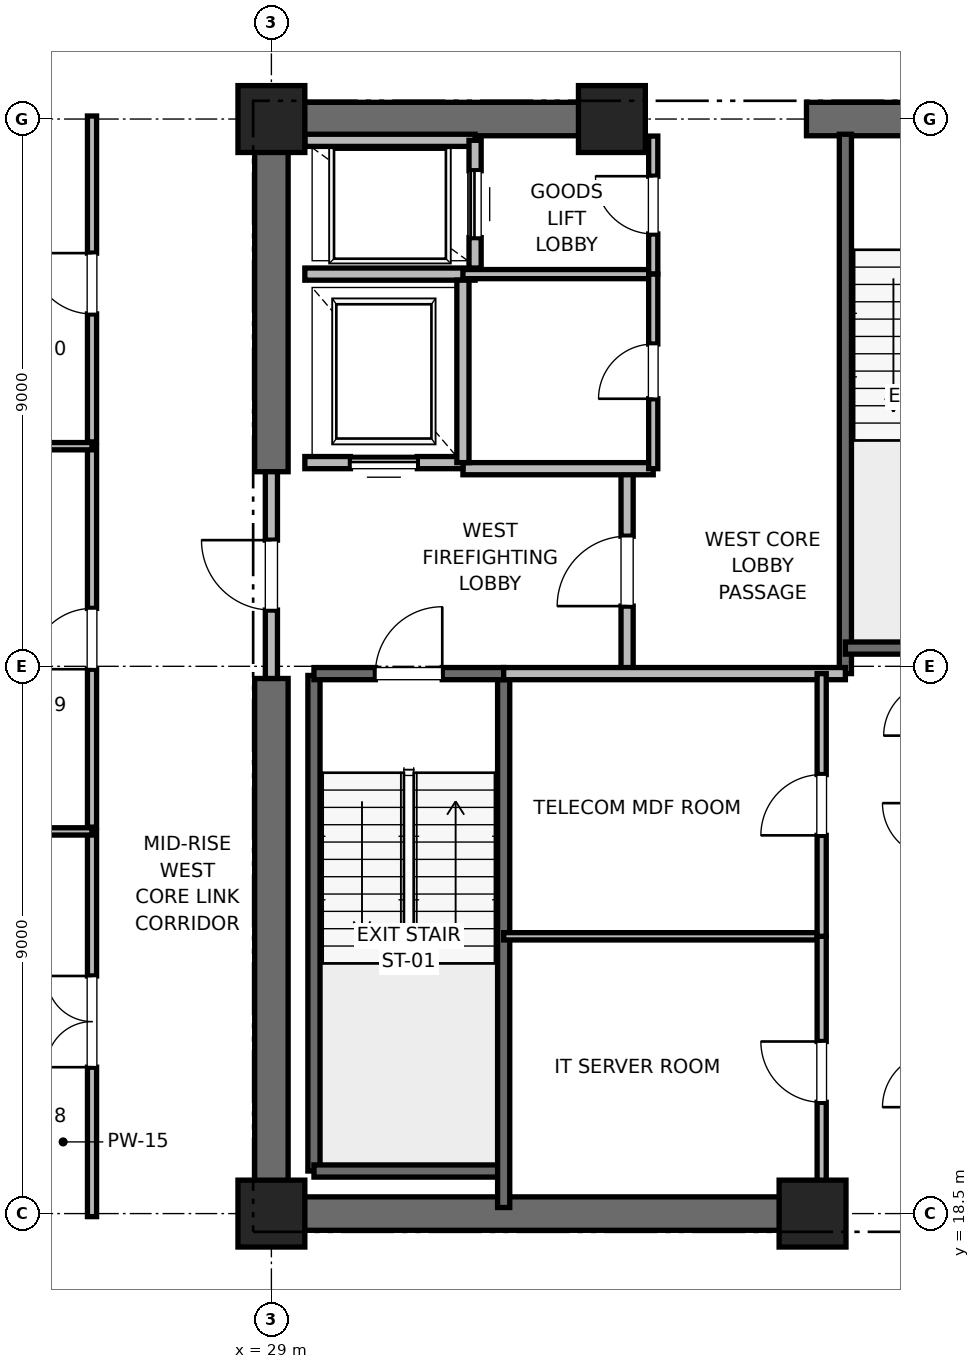
"""IFC4 building model, lengths in metres.
Left out: names, types, materials, properties, quantities, classifications, styles, units other than length and angle.
Written with IfcOpenShell. Run it as: python <this file> out.ifc"""

import sys

from ifc_helpers import new_model, si_unit, direction, frame, frame_2d, origin, origin_2d, place, context, subcontext, project, spatial, rectangle, extrude, element, fill, save


model = new_model("IFC4")
c1 = context("Model", 3, precision=1e-05, world=origin(), true_north=direction((0.0, 1.0)))
c2 = subcontext(c1, "Body", "Model", "MODEL_VIEW")
j1 = project(units=[si_unit("LENGTHUNIT", "METRE"), si_unit("PLANEANGLEUNIT", "RADIAN")], contexts=[c1])
p1 = place(None, origin())
s1 = spatial("IfcSite", under=j1, at=p1, CompositionType="ELEMENT")
p2 = place(p1, origin())
s2 = spatial("IfcBuilding", under=s1, at=p2, CompositionType="ELEMENT")
p3 = place(p2, frame((0.0, 0.0, 168.4)))
s3 = spatial("IfcBuildingStorey", under=s2, at=p3, CompositionType="ELEMENT", Elevation=168.4)
for number, where, z_axis, x_axis in (
    (1, (29.0, 18.5, 0.0), (0.0, 0.0, 1.0), (1.0, 0.0, 0.0)),
    (2, (29.0, 36.5, 0.0), (0.0, 0.0, 1.0), (1.0, 0.0, 0.0)),
    (3, (37.9, 18.5, 0.0), (0.0, 0.0, 1.0), (1.0, 0.0, 0.0)),
    (4, (34.6, 36.5, 0.0), (0.0, 0.0, 1.0), (1.0, 0.0, 0.0)),
):
    element("IfcColumn", number, at=place(p3, frame(where, z_axis=z_axis, x_axis=x_axis)), inside=s3, PredefinedType="PILASTER", context=c2, shape_type="SweptSolid", body=[
        extrude(rectangle(XDim=1.1, YDim=1.1, at=origin_2d()), origin(), (0.0, 0.0, 1.0), 4.0),
    ])
p4 = place(p3, frame((29.0, 18.5, 0.0), z_axis=(0.0, 0.0, 1.0), x_axis=(1.0, 0.0, 0.0)))
e5 = element("IfcWall", 5, at=p4, inside=s3, PredefinedType="SHEAR", context=c2, shape_type="SweptSolid", body=[
    extrude(rectangle(XDim=9.2, YDim=0.55, at=frame_2d((4.6, 0.0))), origin(), (0.0, 0.0, 1.0), 3.775),
])
p5 = place(p3, frame((29.0, 36.5, 0.0), z_axis=(0.0, 0.0, 1.0), x_axis=(1.0, 0.0, 0.0)))
e6 = element("IfcWall", 6, at=p5, inside=s3, PredefinedType="SHEAR", context=c2, shape_type="SweptSolid", body=[
    extrude(rectangle(XDim=5.8, YDim=0.55, at=frame_2d((2.9, 0.0))), origin(), (0.0, 0.0, 1.0), 3.775),
])
p6 = place(p3, frame((37.8, 36.5, 0.0), z_axis=(0.0, 0.0, 1.0), x_axis=(1.0, 0.0, 0.0)))
e7 = element("IfcWall", 7, at=p6, inside=s3, PredefinedType="SHEAR", context=c2, shape_type="SweptSolid", body=[
    extrude(rectangle(XDim=4.4, YDim=0.55, at=frame_2d((2.2, 0.0))), origin(), (0.0, 0.0, 1.0), 3.775),
])
p7 = place(p6, frame((1.65, 0.0, 0.0)))
e8 = element("IfcOpeningElement", 8, at=p7, cuts=e7, PredefinedType="OPENING", context=c2, shape_type="SweptSolid", body=[
    extrude(rectangle(XDim=1.1, YDim=2.15, at=frame_2d((0.55, 1.075))), frame((0.0, 0.275, 0.0), z_axis=(0.0, -1.0, 0.0), x_axis=(1.0, 0.0, 0.0)), (0.0, 0.0, 1.0), 0.55),
])
p8 = place(p3, frame((29.0, 18.5, 0.0), z_axis=(0.0, 0.0, 1.0), x_axis=(0.0, 1.0, 0.0)))
e9 = element("IfcWall", 9, at=p8, inside=s3, PredefinedType="SHEAR", context=c2, shape_type="SweptSolid", body=[
    extrude(rectangle(XDim=8.8, YDim=0.55, at=frame_2d((4.4, 0.0))), origin(), (0.0, 0.0, 1.0), 3.775),
])
p9 = place(p3, frame((29.0, 30.7, 0.0), z_axis=(0.0, 0.0, 1.0), x_axis=(0.0, 1.0, 0.0)))
e10 = element("IfcWall", 10, at=p9, inside=s3, PredefinedType="SHEAR", context=c2, shape_type="SweptSolid", body=[
    extrude(rectangle(XDim=5.8, YDim=0.55, at=frame_2d((2.9, 0.0))), origin(), (0.0, 0.0, 1.0), 3.775),
])
p10 = place(p3, frame((29.7, 19.2, 0.0), z_axis=(0.0, 0.0, 1.0), x_axis=(0.0, 1.0, 0.0)))
e11 = element("IfcWall", 11, at=p10, inside=s3, PredefinedType="SOLIDWALL", context=c2, shape_type="SweptSolid", body=[
    extrude(rectangle(XDim=8.15, YDim=0.2, at=frame_2d((4.075, 0.0))), origin(), (0.0, 0.0, 1.0), 3.775),
])
p11 = place(p3, frame((29.7, 19.2, 0.0), z_axis=(0.0, 0.0, 1.0), x_axis=(1.0, 0.0, 0.0)))
e12 = element("IfcWall", 12, at=p11, inside=s3, PredefinedType="SOLIDWALL", context=c2, shape_type="SweptSolid", body=[
    extrude(rectangle(XDim=3.12, YDim=0.2, at=frame_2d((1.56, 0.0))), origin(), (0.0, 0.0, 1.0), 3.775),
])
p12 = place(p3, frame((32.82, 18.6, 0.0), z_axis=(0.0, 0.0, 1.0), x_axis=(0.0, 1.0, 0.0)))
e13 = element("IfcWall", 13, at=p12, inside=s3, PredefinedType="SOLIDWALL", context=c2, shape_type="SweptSolid", body=[
    extrude(rectangle(XDim=8.78, YDim=0.2, at=frame_2d((4.39, 0.0))), origin(), (0.0, 0.0, 1.0), 3.775),
])
p13 = place(p3, frame((29.7, 27.38, 0.0), z_axis=(0.0, 0.0, 1.0), x_axis=(1.0, 0.0, 0.0)))
e14 = element("IfcWall", 14, at=p13, inside=s3, PredefinedType="SOLIDWALL", context=c2, shape_type="SweptSolid", body=[
    extrude(rectangle(XDim=3.12, YDim=0.2, at=frame_2d((1.56, 0.0))), origin(), (0.0, 0.0, 1.0), 3.775),
])
p14 = place(p13, frame((1.01, 0.0, 0.0)))
e15 = element("IfcOpeningElement", 15, at=p14, cuts=e14, PredefinedType="OPENING", context=c2, shape_type="SweptSolid", body=[
    extrude(rectangle(XDim=1.1, YDim=2.15, at=frame_2d((0.55, 1.075))), frame((0.0, 0.1, 0.0), z_axis=(0.0, -1.0, 0.0), x_axis=(1.0, 0.0, 0.0)), (0.0, 0.0, 1.0), 0.2),
])
p15 = place(p3, frame((38.44, 27.38, 0.0), z_axis=(0.0, 0.0, 1.0), x_axis=(0.0, 1.0, 0.0)))
e16 = element("IfcWall", 16, at=p15, inside=s3, PredefinedType="SOLIDWALL", context=c2, shape_type="SweptSolid", body=[
    extrude(rectangle(XDim=8.87, YDim=0.2, at=frame_2d((4.435, 0.0))), origin(), (0.0, 0.0, 1.0), 3.775),
])
p16 = place(p3, frame((38.44, 27.8, 0.0), z_axis=(0.0, 0.0, 1.0), x_axis=(1.0, 0.0, 0.0)))
e17 = element("IfcWall", 17, at=p16, inside=s3, PredefinedType="SOLIDWALL", context=c2, shape_type="SweptSolid", body=[
    extrude(rectangle(XDim=3.32, YDim=0.2, at=frame_2d((1.66, 0.0))), origin(), (0.0, 0.0, 1.0), 3.775),
])
p17 = place(p3, frame((34.85, 27.38, 0.0), z_axis=(0.0, 0.0, 1.0), x_axis=(0.0, 1.0, 0.0)))
e18 = element("IfcWall", 18, at=p17, inside=s3, PredefinedType="PARTITIONING", context=c2, shape_type="SweptSolid", body=[
    extrude(rectangle(XDim=3.37, YDim=0.2, at=frame_2d((1.685, 0.0))), origin(), (0.0, 0.0, 1.0), 3.775),
])
p18 = place(p17, frame((1.11, 0.0, 0.0)))
e19 = element("IfcOpeningElement", 19, at=p18, cuts=e18, PredefinedType="OPENING", context=c2, shape_type="SweptSolid", body=[
    extrude(rectangle(XDim=1.15, YDim=2.2, at=frame_2d((0.575, 1.1))), frame((0.0, 0.1, 0.0), z_axis=(0.0, -1.0, 0.0), x_axis=(1.0, 0.0, 0.0)), (0.0, 0.0, 1.0), 0.2),
])
p19 = place(p3, frame((29.0, 27.3, 0.0), z_axis=(0.0, 0.0, 1.0), x_axis=(0.0, 1.0, 0.0)))
e20 = element("IfcWall", 20, at=p19, inside=s3, PredefinedType="PARTITIONING", context=c2, shape_type="SweptSolid", body=[
    extrude(rectangle(XDim=3.4, YDim=0.2, at=frame_2d((1.7, 0.0))), origin(), (0.0, 0.0, 1.0), 2.755),
])
p20 = place(p19, frame((1.125, 0.0, 0.0)))
e21 = element("IfcOpeningElement", 21, at=p20, cuts=e20, PredefinedType="OPENING", context=c2, shape_type="SweptSolid", body=[
    extrude(rectangle(XDim=1.15, YDim=2.2, at=frame_2d((0.575, 1.1))), frame((0.0, 0.1, 0.0), z_axis=(0.0, -1.0, 0.0), x_axis=(1.0, 0.0, 0.0)), (0.0, 0.0, 1.0), 0.2),
])
p21 = place(p3, frame((32.82, 27.38, 0.0), z_axis=(0.0, 0.0, 1.0), x_axis=(1.0, 0.0, 0.0)))
e22 = element("IfcWall", 22, at=p21, inside=s3, PredefinedType="PARTITIONING", context=c2, shape_type="SweptSolid", body=[
    extrude(rectangle(XDim=5.62, YDim=0.2, at=frame_2d((2.81, 0.0))), origin(), (0.0, 0.0, 1.0), 3.775),
])
p22 = place(p3, frame((32.15, 30.75, 0.0), z_axis=(0.0, 0.0, 1.0), x_axis=(1.0, 0.0, 0.0)))
e23 = element("IfcWall", 23, at=p22, inside=s3, PredefinedType="PARTITIONING", context=c2, shape_type="SweptSolid", body=[
    extrude(rectangle(XDim=3.13, YDim=0.2, at=frame_2d((1.565, 0.0))), origin(), (0.0, 0.0, 1.0), 3.775),
])
p23 = place(p3, frame((29.55, 30.85, 0.0), z_axis=(0.0, 0.0, 1.0), x_axis=(1.0, 0.0, 0.0)))
e24 = element("IfcWall", 24, at=p23, inside=s3, PredefinedType="SOLIDWALL", context=c2, shape_type="SweptSolid", body=[
    extrude(rectangle(XDim=2.6, YDim=0.2, at=frame_2d((1.3, 0.0))), origin(), (0.0, 0.0, 1.0), 2.755),
])
p24 = place(p23, frame((0.75, 0.0, 0.0)))
e25 = element("IfcOpeningElement", 25, at=p24, cuts=e24, PredefinedType="OPENING", context=c2, shape_type="SweptSolid", body=[
    extrude(rectangle(XDim=1.1, YDim=2.2, at=frame_2d((0.55, 1.1))), frame((0.0, 0.1, 0.0), z_axis=(0.0, -1.0, 0.0), x_axis=(1.0, 0.0, 0.0)), (0.0, 0.0, 1.0), 0.2),
])
p25 = place(p3, frame((29.55, 33.95, 0.0), z_axis=(0.0, 0.0, 1.0), x_axis=(1.0, 0.0, 0.0)))
e26 = element("IfcWall", 26, at=p25, inside=s3, PredefinedType="SOLIDWALL", context=c2, shape_type="SweptSolid", body=[
    extrude(rectangle(XDim=2.8, YDim=0.2, at=frame_2d((1.4, 0.0))), origin(), (0.0, 0.0, 1.0), 3.775),
])
p26 = place(p3, frame((32.15, 30.85, 0.0), z_axis=(0.0, 0.0, 1.0), x_axis=(0.0, 1.0, 0.0)))
e27 = element("IfcWall", 27, at=p26, inside=s3, PredefinedType="SOLIDWALL", context=c2, shape_type="SweptSolid", body=[
    extrude(rectangle(XDim=3.0, YDim=0.2, at=frame_2d((1.5, 0.0))), origin(), (0.0, 0.0, 1.0), 3.775),
])
p27 = place(p3, frame((32.35, 36.15, 0.0), z_axis=(0.0, 0.0, 1.0), x_axis=(-1.0, 0.0, 0.0)))
e28 = element("IfcWall", 28, at=p27, inside=s3, PredefinedType="SOLIDWALL", context=c2, shape_type="SweptSolid", body=[
    extrude(rectangle(XDim=2.8, YDim=0.2, at=frame_2d((1.4, 0.0))), origin(), (0.0, 0.0, 1.0), 2.985),
])
p28 = place(p3, frame((32.35, 34.05, 0.0), z_axis=(0.0, 0.0, 1.0), x_axis=(0.0, 1.0, 0.0)))
e29 = element("IfcWall", 29, at=p28, inside=s3, PredefinedType="SOLIDWALL", context=c2, shape_type="SweptSolid", body=[
    extrude(rectangle(XDim=2.1, YDim=0.2, at=frame_2d((1.05, 0.0))), origin(), (0.0, 0.0, 1.0), 3.775),
])
p29 = place(p28, frame((0.5, 0.0, 0.0)))
e30 = element("IfcOpeningElement", 30, at=p29, cuts=e29, PredefinedType="OPENING", context=c2, shape_type="SweptSolid", body=[
    extrude(rectangle(XDim=1.1, YDim=2.2, at=frame_2d((0.55, 1.1))), frame((0.0, 0.1, 0.0), z_axis=(0.0, -1.0, 0.0), x_axis=(1.0, 0.0, 0.0)), (0.0, 0.0, 1.0), 0.2),
])
p30 = place(p3, frame((32.15, 33.95, 0.0), z_axis=(0.0, 0.0, 1.0), x_axis=(1.0, 0.0, 0.0)))
e31 = element("IfcWall", 31, at=p30, inside=s3, PredefinedType="PARTITIONING", context=c2, shape_type="SweptSolid", body=[
    extrude(rectangle(XDim=3.13, YDim=0.15, at=frame_2d((1.565, 0.0))), origin(), (0.0, 0.0, 1.0), 2.85),
])
p31 = place(p3, frame((35.28, 33.95, 0.0), z_axis=(0.0, 0.0, 1.0), x_axis=(0.0, 1.0, 0.0)))
e32 = element("IfcWall", 32, at=p31, inside=s3, PredefinedType="PARTITIONING", context=c2, shape_type="SweptSolid", body=[
    extrude(rectangle(XDim=2.27, YDim=0.15, at=frame_2d((1.135, 0.0))), origin(), (0.0, 0.0, 1.0), 2.755),
])
p32 = place(p31, frame((0.66, 0.0, 0.0)))
e33 = element("IfcOpeningElement", 33, at=p32, cuts=e32, PredefinedType="OPENING", context=c2, shape_type="SweptSolid", body=[
    extrude(rectangle(XDim=0.95, YDim=2.15, at=frame_2d((0.475, 1.075))), frame((0.0, 0.075, 0.0), z_axis=(0.0, -1.0, 0.0), x_axis=(1.0, 0.0, 0.0)), (0.0, 0.0, 1.0), 0.15),
])
p33 = place(p3, frame((35.28, 30.75, 0.0), z_axis=(0.0, 0.0, 1.0), x_axis=(0.0, 1.0, 0.0)))
e34 = element("IfcWall", 34, at=p33, inside=s3, PredefinedType="PARTITIONING", context=c2, shape_type="SweptSolid", body=[
    extrude(rectangle(XDim=3.2, YDim=0.15, at=frame_2d((1.6, 0.0))), origin(), (0.0, 0.0, 1.0), 2.85),
])
p34 = place(p33, frame((1.15, 0.0, 0.0)))
e35 = element("IfcOpeningElement", 35, at=p34, cuts=e34, PredefinedType="OPENING", context=c2, shape_type="SweptSolid", body=[
    extrude(rectangle(XDim=0.9, YDim=2.1, at=frame_2d((0.45, 1.05))), frame((0.0, 0.075, 0.0), z_axis=(0.0, -1.0, 0.0), x_axis=(1.0, 0.0, 0.0)), (0.0, 0.0, 1.0), 0.15),
])
p35 = place(p3, frame((32.82, 23.06, 0.0), z_axis=(0.0, 0.0, 1.0), x_axis=(1.0, 0.0, 0.0)))
e36 = element("IfcWall", 36, at=p35, inside=s3, PredefinedType="PARTITIONING", context=c2, shape_type="SweptSolid", body=[
    extrude(rectangle(XDim=5.23, YDim=0.12, at=frame_2d((2.615, 0.0))), origin(), (0.0, 0.0, 1.0), 2.85),
])
p36 = place(p3, frame((38.05, 18.6, 0.0), z_axis=(0.0, 0.0, 1.0), x_axis=(0.0, 1.0, 0.0)))
e37 = element("IfcWall", 37, at=p36, inside=s3, PredefinedType="PARTITIONING", context=c2, shape_type="SweptSolid", body=[
    extrude(rectangle(XDim=4.46, YDim=0.15, at=frame_2d((2.23, 0.0))), origin(), (0.0, 0.0, 1.0), 2.755),
])
p37 = place(p36, frame((1.73, 0.0, 0.0)))
e38 = element("IfcOpeningElement", 38, at=p37, cuts=e37, PredefinedType="OPENING", context=c2, shape_type="SweptSolid", body=[
    extrude(rectangle(XDim=1.0, YDim=2.15, at=frame_2d((0.5, 1.075))), frame((0.0, 0.075, 0.0), z_axis=(0.0, -1.0, 0.0), x_axis=(1.0, 0.0, 0.0)), (0.0, 0.0, 1.0), 0.15),
])
p38 = place(p3, frame((38.05, 23.06, 0.0), z_axis=(0.0, 0.0, 1.0), x_axis=(0.0, 1.0, 0.0)))
e39 = element("IfcWall", 39, at=p38, inside=s3, PredefinedType="PARTITIONING", context=c2, shape_type="SweptSolid", body=[
    extrude(rectangle(XDim=4.32, YDim=0.15, at=frame_2d((2.16, 0.0))), origin(), (0.0, 0.0, 1.0), 2.85),
])
p39 = place(p38, frame((1.66, 0.0, 0.0)))
e40 = element("IfcOpeningElement", 40, at=p39, cuts=e39, PredefinedType="OPENING", context=c2, shape_type="SweptSolid", body=[
    extrude(rectangle(XDim=1.0, YDim=2.15, at=frame_2d((0.5, 1.075))), frame((0.0, 0.075, 0.0), z_axis=(0.0, -1.0, 0.0), x_axis=(1.0, 0.0, 0.0)), (0.0, 0.0, 1.0), 0.15),
])
p40 = place(p3, frame((26.05, 18.45, 0.0), z_axis=(0.0, 0.0, 1.0), x_axis=(0.0, 1.0, 0.0)))
e41 = element("IfcWall", 41, at=p40, inside=s3, PredefinedType="PARTITIONING", context=c2, shape_type="SweptSolid", body=[
    extrude(rectangle(XDim=6.335, YDim=0.15, at=frame_2d((3.167, 0.0))), origin(), (0.0, 0.0, 1.0), 2.85),
])
p41 = place(p40, frame((2.458, 0.0, 0.0)))
e42 = element("IfcOpeningElement", 42, at=p41, cuts=e41, PredefinedType="OPENING", context=c2, shape_type="SweptSolid", body=[
    extrude(rectangle(XDim=1.5, YDim=2.25, at=frame_2d((0.75, 1.125))), frame((0.0, 0.075, 0.0), z_axis=(0.0, -1.0, 0.0), x_axis=(1.0, 0.0, 0.0)), (0.0, 0.0, 1.0), 0.15),
])
p42 = place(p3, frame((14.897, 24.785, 0.0), z_axis=(0.0, 0.0, 1.0), x_axis=(1.0, 0.0, 0.0)))
e43 = element("IfcWall", 43, at=p42, inside=s3, PredefinedType="PARTITIONING", context=c2, shape_type="SweptSolid", body=[
    extrude(rectangle(XDim=11.153, YDim=0.12, at=frame_2d((5.577, 0.0))), origin(), (0.0, 0.0, 1.0), 2.85),
])
p43 = place(p3, frame((26.05, 24.855, 0.0), z_axis=(0.0, 0.0, 1.0), x_axis=(0.0, 1.0, 0.0)))
e44 = element("IfcWall", 44, at=p43, inside=s3, PredefinedType="PARTITIONING", context=c2, shape_type="SweptSolid", body=[
    extrude(rectangle(XDim=6.265, YDim=0.15, at=frame_2d((3.133, 0.0))), origin(), (0.0, 0.0, 1.0), 2.85),
])
p44 = place(p43, frame((2.597, 0.0, 0.0)))
e45 = element("IfcOpeningElement", 45, at=p44, cuts=e44, PredefinedType="OPENING", context=c2, shape_type="SweptSolid", body=[
    extrude(rectangle(XDim=1.0, YDim=2.15, at=frame_2d((0.5, 1.075))), frame((0.0, 0.075, 0.0), z_axis=(0.0, -1.0, 0.0), x_axis=(1.0, 0.0, 0.0)), (0.0, 0.0, 1.0), 0.15),
])
p45 = place(p3, frame((14.897, 31.12, 0.0), z_axis=(0.0, 0.0, 1.0), x_axis=(1.0, 0.0, 0.0)))
e46 = element("IfcWall", 46, at=p45, inside=s3, PredefinedType="PARTITIONING", context=c2, shape_type="SweptSolid", body=[
    extrude(rectangle(XDim=11.153, YDim=0.12, at=frame_2d((5.577, 0.0))), origin(), (0.0, 0.0, 1.0), 2.85),
])
p46 = place(p3, frame((26.05, 31.19, 0.0), z_axis=(0.0, 0.0, 1.0), x_axis=(0.0, 1.0, 0.0)))
e47 = element("IfcWall", 47, at=p46, inside=s3, PredefinedType="PARTITIONING", context=c2, shape_type="SweptSolid", body=[
    extrude(rectangle(XDim=5.36, YDim=0.15, at=frame_2d((2.68, 0.0))), origin(), (0.0, 0.0, 1.0), 2.85),
])
p47 = place(p46, frame((2.105, 0.0, 0.0)))
e48 = element("IfcOpeningElement", 48, at=p47, cuts=e47, PredefinedType="OPENING", context=c2, shape_type="SweptSolid", body=[
    extrude(rectangle(XDim=1.0, YDim=2.15, at=frame_2d((0.5, 1.075))), frame((0.0, 0.075, 0.0), z_axis=(0.0, -1.0, 0.0), x_axis=(1.0, 0.0, 0.0)), (0.0, 0.0, 1.0), 0.15),
])
p48 = place(p14, origin())
e49 = element("IfcDoor", 49, at=p48, inside=s3, OperationType="SINGLE_SWING_RIGHT", PredefinedType="DOOR", context=c2, shape_type="SweptSolid", body=[
    extrude(rectangle(XDim=1.1, YDim=2.15, at=frame_2d((0.55, 1.075))), frame((0.0, 0.025, 0.0), z_axis=(0.0, -1.0, 0.0), x_axis=(1.0, 0.0, 0.0)), (0.0, 0.0, 1.0), 0.05),
])
fill(e15, e49)
p49 = place(p18, origin())
e50 = element("IfcDoor", 50, at=p49, inside=s3, OperationType="SINGLE_SWING_LEFT", PredefinedType="DOOR", context=c2, shape_type="SweptSolid", body=[
    extrude(rectangle(XDim=1.15, YDim=2.2, at=frame_2d((0.575, 1.1))), frame((0.0, 0.025, 0.0), z_axis=(0.0, -1.0, 0.0), x_axis=(1.0, 0.0, 0.0)), (0.0, 0.0, 1.0), 0.05),
])
fill(e19, e50)
p50 = place(p20, origin())
e51 = element("IfcDoor", 51, at=p50, inside=s3, OperationType="SINGLE_SWING_RIGHT", PredefinedType="DOOR", context=c2, shape_type="SweptSolid", body=[
    extrude(rectangle(XDim=1.15, YDim=2.2, at=frame_2d((0.575, 1.1))), frame((0.0, 0.025, 0.0), z_axis=(0.0, -1.0, 0.0), x_axis=(1.0, 0.0, 0.0)), (0.0, 0.0, 1.0), 0.05),
])
fill(e21, e51)
p51 = place(p24, origin())
e52 = element("IfcDoor", 52, at=p51, inside=s3, OperationType="SLIDING_TO_RIGHT", PredefinedType="DOOR", context=c2, shape_type="SweptSolid", body=[
    extrude(rectangle(XDim=1.1, YDim=2.2, at=frame_2d((0.55, 1.1))), frame((0.0, 0.025, 0.0), z_axis=(0.0, -1.0, 0.0), x_axis=(1.0, 0.0, 0.0)), (0.0, 0.0, 1.0), 0.05),
])
fill(e25, e52)
p52 = place(p29, origin())
e53 = element("IfcDoor", 53, at=p52, inside=s3, OperationType="SLIDING_TO_RIGHT", PredefinedType="DOOR", context=c2, shape_type="SweptSolid", body=[
    extrude(rectangle(XDim=1.1, YDim=2.2, at=frame_2d((0.55, 1.1))), frame((0.0, 0.025, 0.0), z_axis=(0.0, -1.0, 0.0), x_axis=(1.0, 0.0, 0.0)), (0.0, 0.0, 1.0), 0.05),
])
fill(e30, e53)
p53 = place(p32, origin())
e54 = element("IfcDoor", 54, at=p53, inside=s3, OperationType="SINGLE_SWING_RIGHT", PredefinedType="DOOR", context=c2, shape_type="SweptSolid", body=[
    extrude(rectangle(XDim=0.95, YDim=2.15, at=frame_2d((0.475, 1.075))), frame((0.0, 0.025, 0.0), z_axis=(0.0, -1.0, 0.0), x_axis=(1.0, 0.0, 0.0)), (0.0, 0.0, 1.0), 0.05),
])
fill(e33, e54)
p54 = place(p34, origin())
e55 = element("IfcDoor", 55, at=p54, inside=s3, OperationType="SINGLE_SWING_LEFT", PredefinedType="DOOR", context=c2, shape_type="SweptSolid", body=[
    extrude(rectangle(XDim=0.9, YDim=2.1, at=frame_2d((0.45, 1.05))), frame((0.0, 0.025, 0.0), z_axis=(0.0, -1.0, 0.0), x_axis=(1.0, 0.0, 0.0)), (0.0, 0.0, 1.0), 0.05),
])
fill(e35, e55)
p55 = place(p37, origin())
e56 = element("IfcDoor", 56, at=p55, inside=s3, OperationType="SINGLE_SWING_RIGHT", PredefinedType="DOOR", context=c2, shape_type="SweptSolid", body=[
    extrude(rectangle(XDim=1.0, YDim=2.15, at=frame_2d((0.5, 1.075))), frame((0.0, 0.025, 0.0), z_axis=(0.0, -1.0, 0.0), x_axis=(1.0, 0.0, 0.0)), (0.0, 0.0, 1.0), 0.05),
])
fill(e38, e56)
p56 = place(p39, origin())
e57 = element("IfcDoor", 57, at=p56, inside=s3, OperationType="SINGLE_SWING_LEFT", PredefinedType="DOOR", context=c2, shape_type="SweptSolid", body=[
    extrude(rectangle(XDim=1.0, YDim=2.15, at=frame_2d((0.5, 1.075))), frame((0.0, 0.025, 0.0), z_axis=(0.0, -1.0, 0.0), x_axis=(1.0, 0.0, 0.0)), (0.0, 0.0, 1.0), 0.05),
])
fill(e40, e57)
p57 = place(p41, origin())
e58 = element("IfcDoor", 58, at=p57, inside=s3, OperationType="DOUBLE_DOOR_SINGLE_SWING", PredefinedType="DOOR", context=c2, shape_type="SweptSolid", body=[
    extrude(rectangle(XDim=1.5, YDim=2.25, at=frame_2d((0.75, 1.125))), frame((0.0, 0.025, 0.0), z_axis=(0.0, -1.0, 0.0), x_axis=(1.0, 0.0, 0.0)), (0.0, 0.0, 1.0), 0.05),
])
fill(e42, e58)
p58 = place(p44, origin())
e59 = element("IfcDoor", 59, at=p58, inside=s3, OperationType="SINGLE_SWING_LEFT", PredefinedType="DOOR", context=c2, shape_type="SweptSolid", body=[
    extrude(rectangle(XDim=1.0, YDim=2.15, at=frame_2d((0.5, 1.075))), frame((0.0, 0.025, 0.0), z_axis=(0.0, -1.0, 0.0), x_axis=(1.0, 0.0, 0.0)), (0.0, 0.0, 1.0), 0.05),
])
fill(e45, e59)
p59 = place(p47, origin())
e60 = element("IfcDoor", 60, at=p59, inside=s3, OperationType="SINGLE_SWING_RIGHT", PredefinedType="DOOR", context=c2, shape_type="SweptSolid", body=[
    extrude(rectangle(XDim=1.0, YDim=2.15, at=frame_2d((0.5, 1.075))), frame((0.0, 0.025, 0.0), z_axis=(0.0, -1.0, 0.0), x_axis=(1.0, 0.0, 0.0)), (0.0, 0.0, 1.0), 0.05),
])
fill(e48, e60)
save(model, sys.argv[1])
